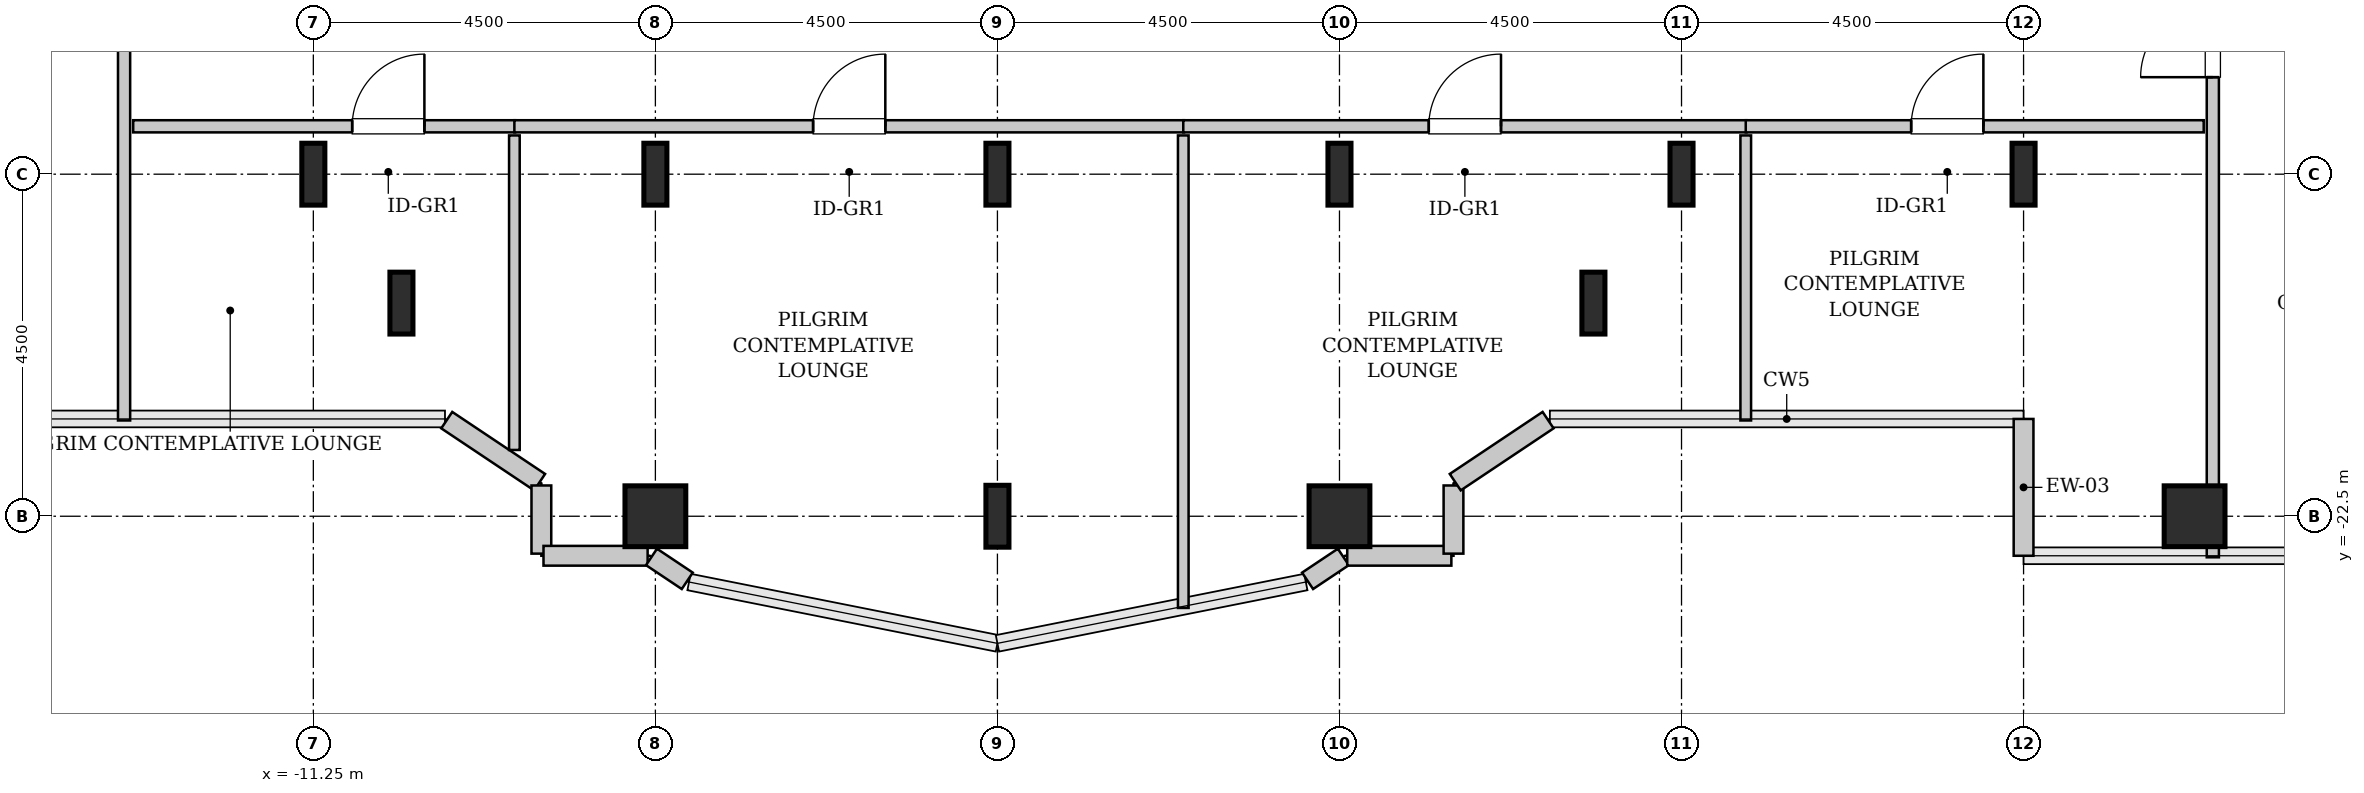
"""IFC4 building model, lengths in metres.
Left out: names, types, materials, properties, quantities, classifications, styles, units other than length and angle.
Written with IfcOpenShell. Run it as: python <this file> out.ifc"""

import sys

from ifc_helpers import new_model, si_unit, direction, frame, frame_2d, origin, origin_2d, place, context, subcontext, project, spatial, rectangle, hollow_rectangle, i_section, extrude, source, transform, mapped, element, fill, save


model = new_model("IFC4")
c1 = context("Model", 3, precision=1e-05, world=origin(), true_north=direction((0.0, 1.0)))
c2 = subcontext(c1, "Body", "Model", "MODEL_VIEW")
j1 = project(units=[si_unit("LENGTHUNIT", "METRE"), si_unit("PLANEANGLEUNIT", "RADIAN")], contexts=[c1])
p1 = place(None, origin())
s1 = spatial("IfcSite", under=j1, at=p1, CompositionType="ELEMENT")
p2 = place(p1, origin())
s2 = spatial("IfcBuilding", under=s1, at=p2, CompositionType="ELEMENT")
p3 = place(p2, frame((0.0, 0.0, 160.2)))
s3 = spatial("IfcBuildingStorey", under=s2, at=p3, CompositionType="ELEMENT", Elevation=160.2)
m1 = source(origin(), c2, "Body", "SweptSolid", [
    extrude(i_section(OverallWidth=0.303, OverallDepth=0.814, WebThickness=0.021, FlangeThickness=0.04, FilletRadius=0.03, at=origin_2d()), origin(), (0.0, 0.0, 1.0), 3.8),
])
for number, where, z_axis, x_axis in (
    (1, (-11.25, -18.0, 0.0), (0.0, 0.0, 1.0), (1.0, 0.0, 0.0)),
    (2, (-10.091, -19.696, 0.0), (0.0, 0.0, 1.0), (1.0, 0.0, 0.0)),
):
    element("IfcColumn", number, at=place(p3, frame(where, z_axis=z_axis, x_axis=x_axis)), inside=s3, PredefinedType="COLUMN", context=c2, shape_type="MappedRepresentation", body=[
        mapped(m1, transform((0.0, 0.0, 0.0), x_axis=(1.0, 0.0, 0.0), y_axis=(0.0, 1.0, 0.0), z_axis=(0.0, 0.0, 1.0), scale=1.0)),
    ])
m2 = source(origin(), c2, "Body", "SweptSolid", [
    extrude(hollow_rectangle(XDim=0.8, YDim=0.8, WallThickness=0.04, InnerFilletRadius=0.04, OuterFilletRadius=0.08, at=origin_2d()), origin(), (0.0, 0.0, 1.0), 3.8),
])
p4 = place(p3, frame((-6.75, -22.5, 0.0), z_axis=(0.0, 0.0, 1.0), x_axis=(1.0, 0.0, 0.0)))
e3 = element("IfcColumn", 3, at=p4, inside=s3, PredefinedType="COLUMN", context=c2, shape_type="MappedRepresentation", body=[
    mapped(m2, transform((0.0, 0.0, 0.0), x_axis=(1.0, 0.0, 0.0), y_axis=(0.0, 1.0, 0.0), z_axis=(0.0, 0.0, 1.0), scale=1.0)),
])
for number, where, z_axis, x_axis in (
    (4, (-6.75, -18.0, 0.0), (0.0, 0.0, 1.0), (1.0, 0.0, 0.0)),
    (5, (-2.25, -22.5, 0.0), (0.0, 0.0, 1.0), (1.0, 0.0, 0.0)),
    (6, (-2.25, -18.0, 0.0), (0.0, 0.0, 1.0), (1.0, 0.0, 0.0)),
):
    element("IfcColumn", number, at=place(p3, frame(where, z_axis=z_axis, x_axis=x_axis)), inside=s3, PredefinedType="COLUMN", context=c2, shape_type="MappedRepresentation", body=[
        mapped(m1, transform((0.0, 0.0, 0.0), x_axis=(1.0, 0.0, 0.0), y_axis=(0.0, 1.0, 0.0), z_axis=(0.0, 0.0, 1.0), scale=1.0)),
    ])
p5 = place(p3, frame((2.25, -22.5, 0.0), z_axis=(0.0, 0.0, 1.0), x_axis=(1.0, 0.0, 0.0)))
e7 = element("IfcColumn", 7, at=p5, inside=s3, PredefinedType="COLUMN", context=c2, shape_type="MappedRepresentation", body=[
    mapped(m2, transform((0.0, 0.0, 0.0), x_axis=(1.0, 0.0, 0.0), y_axis=(0.0, 1.0, 0.0), z_axis=(0.0, 0.0, 1.0), scale=1.0)),
])
for number, where, z_axis, x_axis in (
    (8, (2.25, -18.0, 0.0), (0.0, 0.0, 1.0), (1.0, 0.0, 0.0)),
    (9, (5.591, -19.696, 0.0), (0.0, 0.0, 1.0), (1.0, 0.0, 0.0)),
    (10, (6.75, -18.0, 0.0), (0.0, 0.0, 1.0), (1.0, 0.0, 0.0)),
    (11, (11.25, -18.0, 0.0), (0.0, 0.0, 1.0), (1.0, 0.0, 0.0)),
):
    element("IfcColumn", number, at=place(p3, frame(where, z_axis=z_axis, x_axis=x_axis)), inside=s3, PredefinedType="COLUMN", context=c2, shape_type="MappedRepresentation", body=[
        mapped(m1, transform((0.0, 0.0, 0.0), x_axis=(1.0, 0.0, 0.0), y_axis=(0.0, 1.0, 0.0), z_axis=(0.0, 0.0, 1.0), scale=1.0)),
    ])
p6 = place(p3, frame((13.5, -22.5, 0.0), z_axis=(0.0, 0.0, 1.0), x_axis=(1.0, 0.0, 0.0)))
e12 = element("IfcColumn", 12, at=p6, inside=s3, PredefinedType="COLUMN", context=c2, shape_type="MappedRepresentation", body=[
    mapped(m2, transform((0.0, 0.0, 0.0), x_axis=(1.0, 0.0, 0.0), y_axis=(0.0, 1.0, 0.0), z_axis=(0.0, 0.0, 1.0), scale=1.0)),
])
m3 = source(origin(), c2, "Body", "SweptSolid", [
    extrude(rectangle(XDim=1.8, YDim=0.26, at=frame_2d((0.9, 0.0))), origin(), (0.0, 0.0, 1.0), 3.55),
])
p7 = place(p3, frame((11.25, -21.22, 0.0), z_axis=(0.0, 0.0, 1.0), x_axis=(0.0, -1.0, 0.0)))
e13 = element("IfcWall", 13, at=p7, inside=s3, PredefinedType="SOLIDWALL", context=c2, shape_type="MappedRepresentation", body=[
    mapped(m3, transform((0.0, 0.0, 0.0), x_axis=(1.0, 0.0, 0.0), y_axis=(0.0, 1.0, 0.0), z_axis=(0.0, 0.0, 1.0), scale=1.0)),
])
m4 = source(origin(), c2, "Body", "SweptSolid", [
    extrude(rectangle(XDim=1.469, YDim=0.26, at=frame_2d((0.734, 0.0))), origin(), (0.0, 0.0, 1.0), 3.55),
])
p8 = place(p3, frame((-9.495, -21.236, 0.0), z_axis=(0.0, 0.0, 1.0), x_axis=(0.831461760506, -0.555581983884, 0.0)))
e14 = element("IfcWall", 14, at=p8, inside=s3, PredefinedType="SOLIDWALL", context=c2, shape_type="MappedRepresentation", body=[
    mapped(m4, transform((0.0, 0.0, 0.0), x_axis=(1.0, 0.0, 0.0), y_axis=(0.0, 1.0, 0.0), z_axis=(0.0, 0.0, 1.0), scale=1.0)),
])
m5 = source(origin(), c2, "Body", "SweptSolid", [
    extrude(rectangle(XDim=0.897, YDim=0.26, at=frame_2d((0.448, 0.0))), origin(), (0.0, 0.0, 1.0), 3.55),
])
p9 = place(p3, frame((-8.25, -22.095, 0.0), z_axis=(0.0, 0.0, 1.0), x_axis=(0.0, -1.0, 0.0)))
e15 = element("IfcWall", 15, at=p9, inside=s3, PredefinedType="SOLIDWALL", context=c2, shape_type="MappedRepresentation", body=[
    mapped(m5, transform((0.0, 0.0, 0.0), x_axis=(1.0, 0.0, 0.0), y_axis=(0.0, 1.0, 0.0), z_axis=(0.0, 0.0, 1.0), scale=1.0)),
])
m6 = source(origin(), c2, "Body", "SweptSolid", [
    extrude(rectangle(XDim=1.37, YDim=0.26, at=frame_2d((0.685, 0.0))), origin(), (0.0, 0.0, 1.0), 3.55),
])
p10 = place(p3, frame((-8.222, -23.02, 0.0), z_axis=(0.0, 0.0, 1.0), x_axis=(1.0, 0.0, 0.0)))
e16 = element("IfcWall", 16, at=p10, inside=s3, PredefinedType="SOLIDWALL", context=c2, shape_type="MappedRepresentation", body=[
    mapped(m6, transform((0.0, 0.0, 0.0), x_axis=(1.0, 0.0, 0.0), y_axis=(0.0, 1.0, 0.0), z_axis=(0.0, 0.0, 1.0), scale=1.0)),
])
m7 = source(origin(), c2, "Body", "SweptSolid", [
    extrude(rectangle(XDim=0.565, YDim=0.26, at=frame_2d((0.283, 0.0))), origin(), (0.0, 0.0, 1.0), 3.55),
])
for number, where, z_axis, x_axis in (
    (17, (-6.801, -23.036, 0.0), (0.0, 0.0, 1.0), (0.832, -0.555, 0.0)),
    (18, (1.831, -23.35, 0.0), (0.0, 0.0, 1.0), (0.832, 0.555, 0.0)),
):
    element("IfcWall", number, at=place(p3, frame(where, z_axis=z_axis, x_axis=x_axis)), inside=s3, PredefinedType="SOLIDWALL", context=c2, shape_type="MappedRepresentation", body=[
        mapped(m7, transform((0.0, 0.0, 0.0), x_axis=(1.0, 0.0, 0.0), y_axis=(0.0, 1.0, 0.0), z_axis=(0.0, 0.0, 1.0), scale=1.0)),
    ])
p11 = place(p3, frame((2.352, -23.02, 0.0), z_axis=(0.0, 0.0, 1.0), x_axis=(1.0, 0.0, 0.0)))
e19 = element("IfcWall", 19, at=p11, inside=s3, PredefinedType="SOLIDWALL", context=c2, shape_type="MappedRepresentation", body=[
    mapped(m6, transform((0.0, 0.0, 0.0), x_axis=(1.0, 0.0, 0.0), y_axis=(0.0, 1.0, 0.0), z_axis=(0.0, 0.0, 1.0), scale=1.0)),
])
p12 = place(p3, frame((3.75, -22.992, 0.0), z_axis=(0.0, 0.0, 1.0), x_axis=(0.0, 1.0, 0.0)))
e20 = element("IfcWall", 20, at=p12, inside=s3, PredefinedType="SOLIDWALL", context=c2, shape_type="MappedRepresentation", body=[
    mapped(m5, transform((0.0, 0.0, 0.0), x_axis=(1.0, 0.0, 0.0), y_axis=(0.0, 1.0, 0.0), z_axis=(0.0, 0.0, 1.0), scale=1.0)),
])
p13 = place(p3, frame((3.773, -22.052, 0.0), z_axis=(0.0, 0.0, 1.0), x_axis=(0.831461760506, 0.555581983884, 0.0)))
e21 = element("IfcWall", 21, at=p13, inside=s3, PredefinedType="SOLIDWALL", context=c2, shape_type="MappedRepresentation", body=[
    mapped(m4, transform((0.0, 0.0, 0.0), x_axis=(1.0, 0.0, 0.0), y_axis=(0.0, 1.0, 0.0), z_axis=(0.0, 0.0, 1.0), scale=1.0)),
])
m8 = source(origin(), c2, "Body", "SweptSolid", [
    extrude(rectangle(XDim=12.745, YDim=0.16, at=frame_2d((6.373, 0.0))), origin(), (0.0, 0.0, 1.0), 3.535),
])
p14 = place(p3, frame((-13.74, -21.24, 0.0), z_axis=(0.0, 0.0, 1.0), x_axis=(0.0, 1.0, 0.0)))
e22 = element("IfcWall", 22, at=p14, inside=s3, PredefinedType="PARTITIONING", context=c2, shape_type="MappedRepresentation", body=[
    mapped(m8, transform((0.0, 0.0, 0.0), x_axis=(1.0, 0.0, 0.0), y_axis=(0.0, 1.0, 0.0), z_axis=(0.0, 0.0, 1.0), scale=1.0)),
])
p15 = place(p14, frame((7.812, 0.0, 0.0)))
e23 = element("IfcOpeningElement", 23, at=p15, cuts=e22, PredefinedType="OPENING", context=c2, shape_type="SweptSolid", body=[
    extrude(rectangle(XDim=0.95, YDim=2.1, at=frame_2d((0.475, 1.05))), frame((0.0, 0.09, 0.0), z_axis=(0.0, -1.0, 0.0), x_axis=(1.0, 0.0, 0.0)), (0.0, 0.0, 1.0), 0.18),
])
m9 = source(origin(), c2, "Body", "SweptSolid", [
    extrude(rectangle(XDim=7.953, YDim=0.16, at=frame_2d((3.976, 0.0))), origin(), (0.0, 0.0, 1.0), 3.535),
])
p16 = place(p3, frame((13.74, -23.04, 0.0), z_axis=(0.0, 0.0, 1.0), x_axis=(0.0, 1.0, 0.0)))
e24 = element("IfcWall", 24, at=p16, inside=s3, PredefinedType="PARTITIONING", context=c2, shape_type="MappedRepresentation", body=[
    mapped(m9, transform((0.0, 0.0, 0.0), x_axis=(1.0, 0.0, 0.0), y_axis=(0.0, 1.0, 0.0), z_axis=(0.0, 0.0, 1.0), scale=1.0)),
])
p17 = place(p16, frame((6.316, 0.0, 0.0)))
e25 = element("IfcOpeningElement", 25, at=p17, cuts=e24, PredefinedType="OPENING", context=c2, shape_type="SweptSolid", body=[
    extrude(rectangle(XDim=0.95, YDim=2.1, at=frame_2d((0.475, 1.05))), frame((0.0, 0.09, 0.0), z_axis=(0.0, -1.0, 0.0), x_axis=(1.0, 0.0, 0.0)), (0.0, 0.0, 1.0), 0.18),
])
m10 = source(origin(), c2, "Body", "SweptSolid", [
    extrude(rectangle(XDim=5.025, YDim=0.16, at=frame_2d((2.513, 0.0))), origin(), (0.0, 0.0, 1.0), 3.535),
])
p18 = place(p3, frame((-13.62, -17.37, 0.0), z_axis=(0.0, 0.0, 1.0), x_axis=(1.0, 0.0, 0.0)))
e26 = element("IfcWall", 26, at=p18, inside=s3, PredefinedType="PARTITIONING", context=c2, shape_type="MappedRepresentation", body=[
    mapped(m10, transform((0.0, 0.0, 0.0), x_axis=(1.0, 0.0, 0.0), y_axis=(0.0, 1.0, 0.0), z_axis=(0.0, 0.0, 1.0), scale=1.0)),
])
p19 = place(p18, frame((2.881, 0.0, 0.0)))
e27 = element("IfcOpeningElement", 27, at=p19, cuts=e26, PredefinedType="OPENING", context=c2, shape_type="SweptSolid", body=[
    extrude(rectangle(XDim=0.95, YDim=2.1, at=frame_2d((0.475, 1.05))), frame((0.0, 0.09, 0.0), z_axis=(0.0, -1.0, 0.0), x_axis=(1.0, 0.0, 0.0)), (0.0, 0.0, 1.0), 0.18),
])
m11 = source(origin(), c2, "Body", "SweptSolid", [
    extrude(rectangle(XDim=4.138, YDim=0.14, at=frame_2d((2.069, 0.0))), origin(), (0.0, 0.0, 1.0), 3.535),
])
p20 = place(p3, frame((-8.605, -21.628, 0.0), z_axis=(0.0, 0.0, 1.0), x_axis=(0.0, 1.0, 0.0)))
e28 = element("IfcWall", 28, at=p20, inside=s3, PredefinedType="PARTITIONING", context=c2, shape_type="MappedRepresentation", body=[
    mapped(m11, transform((0.0, 0.0, 0.0), x_axis=(1.0, 0.0, 0.0), y_axis=(0.0, 1.0, 0.0), z_axis=(0.0, 0.0, 1.0), scale=1.0)),
])
m12 = source(origin(), c2, "Body", "SweptSolid", [
    extrude(rectangle(XDim=8.81, YDim=0.16, at=frame_2d((4.405, 0.0))), origin(), (0.0, 0.0, 1.0), 3.535),
])
p21 = place(p3, frame((-8.605, -17.37, 0.0), z_axis=(0.0, 0.0, 1.0), x_axis=(1.0, 0.0, 0.0)))
e29 = element("IfcWall", 29, at=p21, inside=s3, PredefinedType="PARTITIONING", context=c2, shape_type="MappedRepresentation", body=[
    mapped(m12, transform((0.0, 0.0, 0.0), x_axis=(1.0, 0.0, 0.0), y_axis=(0.0, 1.0, 0.0), z_axis=(0.0, 0.0, 1.0), scale=1.0)),
])
p22 = place(p21, frame((3.93, 0.0, 0.0)))
e30 = element("IfcOpeningElement", 30, at=p22, cuts=e29, PredefinedType="OPENING", context=c2, shape_type="SweptSolid", body=[
    extrude(rectangle(XDim=0.95, YDim=2.1, at=frame_2d((0.475, 1.05))), frame((0.0, 0.09, 0.0), z_axis=(0.0, -1.0, 0.0), x_axis=(1.0, 0.0, 0.0)), (0.0, 0.0, 1.0), 0.18),
])
m13 = source(origin(), c2, "Body", "SweptSolid", [
    extrude(rectangle(XDim=6.216, YDim=0.14, at=frame_2d((3.108, 0.0))), origin(), (0.0, 0.0, 1.0), 3.535),
])
p23 = place(p3, frame((0.195, -23.706, 0.0), z_axis=(0.0, 0.0, 1.0), x_axis=(0.0, 1.0, 0.0)))
e31 = element("IfcWall", 31, at=p23, inside=s3, PredefinedType="PARTITIONING", context=c2, shape_type="MappedRepresentation", body=[
    mapped(m13, transform((0.0, 0.0, 0.0), x_axis=(1.0, 0.0, 0.0), y_axis=(0.0, 1.0, 0.0), z_axis=(0.0, 0.0, 1.0), scale=1.0)),
])
m14 = source(origin(), c2, "Body", "SweptSolid", [
    extrude(rectangle(XDim=7.41, YDim=0.16, at=frame_2d((3.705, 0.0))), origin(), (0.0, 0.0, 1.0), 3.535),
])
p24 = place(p3, frame((0.195, -17.37, 0.0), z_axis=(0.0, 0.0, 1.0), x_axis=(1.0, 0.0, 0.0)))
e32 = element("IfcWall", 32, at=p24, inside=s3, PredefinedType="PARTITIONING", context=c2, shape_type="MappedRepresentation", body=[
    mapped(m14, transform((0.0, 0.0, 0.0), x_axis=(1.0, 0.0, 0.0), y_axis=(0.0, 1.0, 0.0), z_axis=(0.0, 0.0, 1.0), scale=1.0)),
])
p25 = place(p24, frame((3.23, 0.0, 0.0)))
e33 = element("IfcOpeningElement", 33, at=p25, cuts=e32, PredefinedType="OPENING", context=c2, shape_type="SweptSolid", body=[
    extrude(rectangle(XDim=0.95, YDim=2.1, at=frame_2d((0.475, 1.05))), frame((0.0, 0.09, 0.0), z_axis=(0.0, -1.0, 0.0), x_axis=(1.0, 0.0, 0.0)), (0.0, 0.0, 1.0), 0.18),
])
m15 = source(origin(), c2, "Body", "SweptSolid", [
    extrude(rectangle(XDim=3.75, YDim=0.14, at=frame_2d((1.875, 0.0))), origin(), (0.0, 0.0, 1.0), 3.535),
])
p26 = place(p3, frame((7.595, -21.24, 0.0), z_axis=(0.0, 0.0, 1.0), x_axis=(0.0, 1.0, 0.0)))
e34 = element("IfcWall", 34, at=p26, inside=s3, PredefinedType="PARTITIONING", context=c2, shape_type="MappedRepresentation", body=[
    mapped(m15, transform((0.0, 0.0, 0.0), x_axis=(1.0, 0.0, 0.0), y_axis=(0.0, 1.0, 0.0), z_axis=(0.0, 0.0, 1.0), scale=1.0)),
])
m16 = source(origin(), c2, "Body", "SweptSolid", [
    extrude(rectangle(XDim=6.025, YDim=0.16, at=frame_2d((3.013, 0.0))), origin(), (0.0, 0.0, 1.0), 3.535),
])
p27 = place(p3, frame((7.595, -17.37, 0.0), z_axis=(0.0, 0.0, 1.0), x_axis=(1.0, 0.0, 0.0)))
e35 = element("IfcWall", 35, at=p27, inside=s3, PredefinedType="PARTITIONING", context=c2, shape_type="MappedRepresentation", body=[
    mapped(m16, transform((0.0, 0.0, 0.0), x_axis=(1.0, 0.0, 0.0), y_axis=(0.0, 1.0, 0.0), z_axis=(0.0, 0.0, 1.0), scale=1.0)),
])
p28 = place(p27, frame((2.176, 0.0, 0.0)))
e36 = element("IfcOpeningElement", 36, at=p28, cuts=e35, PredefinedType="OPENING", context=c2, shape_type="SweptSolid", body=[
    extrude(rectangle(XDim=0.95, YDim=2.1, at=frame_2d((0.475, 1.05))), frame((0.0, 0.09, 0.0), z_axis=(0.0, -1.0, 0.0), x_axis=(1.0, 0.0, 0.0)), (0.0, 0.0, 1.0), 0.18),
])
m17 = source(origin(), c2, "Body", "SweptSolid", [
    extrude(rectangle(XDim=0.95, YDim=2.1, at=frame_2d((0.475, 1.05))), frame((0.0, 0.025, 0.0), z_axis=(0.0, -1.0, 0.0), x_axis=(1.0, 0.0, 0.0)), (0.0, 0.0, 1.0), 0.05),
])
p29 = place(p17, origin())
e37 = element("IfcDoor", 37, at=p29, inside=s3, OperationType="SINGLE_SWING_LEFT", PredefinedType="DOOR", context=c2, shape_type="MappedRepresentation", body=[
    mapped(m17, transform((0.0, 0.0, 0.0), x_axis=(1.0, 0.0, 0.0), y_axis=(0.0, 1.0, 0.0), z_axis=(0.0, 0.0, 1.0), scale=1.0)),
])
fill(e25, e37)
p30 = place(p19, origin())
e38 = element("IfcDoor", 38, at=p30, inside=s3, OperationType="SINGLE_SWING_RIGHT", PredefinedType="DOOR", context=c2, shape_type="MappedRepresentation", body=[
    mapped(m17, transform((0.0, 0.0, 0.0), x_axis=(1.0, 0.0, 0.0), y_axis=(0.0, 1.0, 0.0), z_axis=(0.0, 0.0, 1.0), scale=1.0)),
])
fill(e27, e38)
p31 = place(p22, origin())
e39 = element("IfcDoor", 39, at=p31, inside=s3, OperationType="SINGLE_SWING_RIGHT", PredefinedType="DOOR", context=c2, shape_type="MappedRepresentation", body=[
    mapped(m17, transform((0.0, 0.0, 0.0), x_axis=(1.0, 0.0, 0.0), y_axis=(0.0, 1.0, 0.0), z_axis=(0.0, 0.0, 1.0), scale=1.0)),
])
fill(e30, e39)
p32 = place(p25, origin())
e40 = element("IfcDoor", 40, at=p32, inside=s3, OperationType="SINGLE_SWING_RIGHT", PredefinedType="DOOR", context=c2, shape_type="MappedRepresentation", body=[
    mapped(m17, transform((0.0, 0.0, 0.0), x_axis=(1.0, 0.0, 0.0), y_axis=(0.0, 1.0, 0.0), z_axis=(0.0, 0.0, 1.0), scale=1.0)),
])
fill(e33, e40)
p33 = place(p28, origin())
e41 = element("IfcDoor", 41, at=p33, inside=s3, OperationType="SINGLE_SWING_RIGHT", PredefinedType="DOOR", context=c2, shape_type="MappedRepresentation", body=[
    mapped(m17, transform((0.0, 0.0, 0.0), x_axis=(1.0, 0.0, 0.0), y_axis=(0.0, 1.0, 0.0), z_axis=(0.0, 0.0, 1.0), scale=1.0)),
])
fill(e36, e41)
save(model, sys.argv[1])
